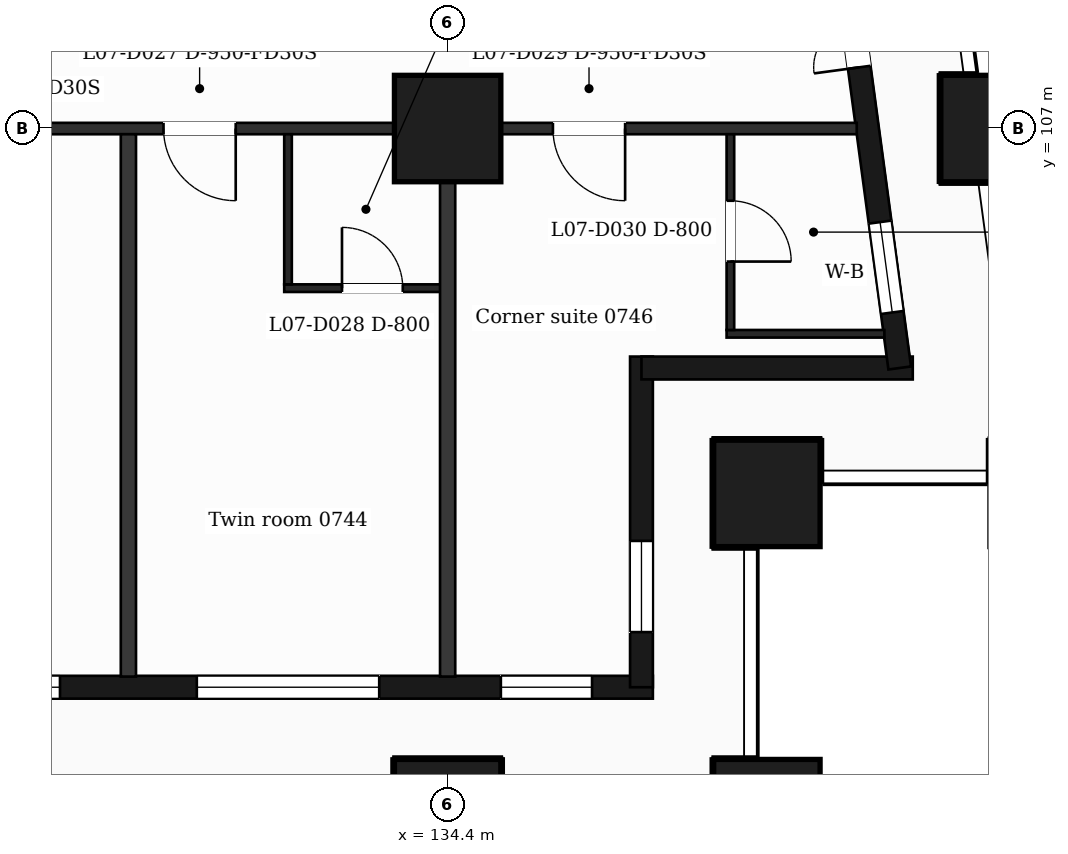
"""IFC4 building model, lengths in metres.
Left out: names, types, materials, properties, quantities, classifications, styles, units other than length and angle.
Written with IfcOpenShell. Run it as: python <this file> out.ifc"""

import sys

from ifc_helpers import new_model, si_unit, direction, frame, frame_2d, origin, origin_2d, place, context, subcontext, project, spatial, rectangle, extrude, element, fill, save


model = new_model("IFC4")
c1 = context("Model", 3, precision=1e-05, world=origin(), true_north=direction((0.0, 1.0)))
c2 = subcontext(c1, "Body", "Model", "MODEL_VIEW")
j1 = project(units=[si_unit("LENGTHUNIT", "METRE"), si_unit("PLANEANGLEUNIT", "RADIAN")], contexts=[c1])
p1 = place(None, origin())
s1 = spatial("IfcSite", under=j1, at=p1, CompositionType="ELEMENT")
p2 = place(p1, origin())
s2 = spatial("IfcBuilding", under=s1, at=p2, CompositionType="ELEMENT")
p3 = place(p2, frame((0.0, 0.0, 42.5)))
s3 = spatial("IfcBuildingStorey", under=s2, at=p3, CompositionType="ELEMENT", Elevation=42.5)
for number, where, z_axis, x_axis in (
    (1, (134.4, 98.0, 0.0), (0.0, 0.0, 1.0), (1.0, 0.0, 0.0)),
    (2, (138.6, 98.0, 0.0), (0.0, 0.0, 1.0), (1.0, 0.0, 0.0)),
    (3, (138.6, 102.2, 0.0), (0.0, 0.0, 1.0), (1.0, 0.0, 0.0)),
    (4, (134.4, 107.0, 0.0), (0.0, 0.0, 1.0), (1.0, 0.0, 0.0)),
    (5, (141.588, 107.0, 0.0), (0.0, 0.0, 1.0), (1.0, 0.0, 0.0)),
):
    element("IfcColumn", number, at=place(p3, frame(where, z_axis=z_axis, x_axis=x_axis)), inside=s3, PredefinedType="COLUMN", context=c2, shape_type="SweptSolid", body=[
        extrude(rectangle(XDim=1.4, YDim=1.4, at=origin_2d()), origin(), (0.0, 0.0, 1.0), 3.5),
    ])
p4 = place(p3, frame((89.85, 99.65, 0.0), z_axis=(0.0, 0.0, 1.0), x_axis=(1.0, 0.0, 0.0)))
e6 = element("IfcWall", 6, at=p4, inside=s3, PredefinedType="SOLIDWALL", context=c2, shape_type="SweptSolid", body=[
    extrude(rectangle(XDim=47.25, YDim=0.3, at=frame_2d((23.625, 0.0))), origin(), (0.0, 0.0, 1.0), 3.18),
])
p5 = place(p4, frame((0.725, 0.0, 0.9)))
e7 = element("IfcOpeningElement", 7, at=p5, cuts=e6, PredefinedType="OPENING", context=c2, shape_type="SweptSolid", body=[
    extrude(rectangle(XDim=1.2, YDim=2.1, at=frame_2d((0.6, 1.05))), frame((0.0, 0.16, 0.0), z_axis=(0.0, -1.0, 0.0), x_axis=(1.0, 0.0, 0.0)), (0.0, 0.0, 1.0), 0.32),
])
p6 = place(p4, frame((3.45, 0.0, 0.9)))
e8 = element("IfcOpeningElement", 8, at=p6, cuts=e6, PredefinedType="OPENING", context=c2, shape_type="SweptSolid", body=[
    extrude(rectangle(XDim=2.4, YDim=2.1, at=frame_2d((1.2, 1.05))), frame((0.0, 0.16, 0.0), z_axis=(0.0, -1.0, 0.0), x_axis=(1.0, 0.0, 0.0)), (0.0, 0.0, 1.0), 0.32),
])
p7 = place(p4, frame((7.35, 0.0, 0.0)))
e9 = element("IfcOpeningElement", 9, at=p7, cuts=e6, PredefinedType="OPENING", context=c2, shape_type="SweptSolid", body=[
    extrude(rectangle(XDim=1.2, YDim=2.4, at=frame_2d((0.6, 1.2))), frame((0.0, 0.16, 0.0), z_axis=(0.0, -1.0, 0.0), x_axis=(1.0, 0.0, 0.0)), (0.0, 0.0, 1.0), 0.32),
])
p8 = place(p4, frame((9.15, 0.0, 0.9)))
e10 = element("IfcOpeningElement", 10, at=p8, cuts=e6, PredefinedType="OPENING", context=c2, shape_type="SweptSolid", body=[
    extrude(rectangle(XDim=1.2, YDim=2.1, at=frame_2d((0.6, 1.05))), frame((0.0, 0.16, 0.0), z_axis=(0.0, -1.0, 0.0), x_axis=(1.0, 0.0, 0.0)), (0.0, 0.0, 1.0), 0.32),
])
p9 = place(p4, frame((11.85, 0.0, 0.9)))
e11 = element("IfcOpeningElement", 11, at=p9, cuts=e6, PredefinedType="OPENING", context=c2, shape_type="SweptSolid", body=[
    extrude(rectangle(XDim=2.4, YDim=2.1, at=frame_2d((1.2, 1.05))), frame((0.0, 0.16, 0.0), z_axis=(0.0, -1.0, 0.0), x_axis=(1.0, 0.0, 0.0)), (0.0, 0.0, 1.0), 0.32),
])
p10 = place(p4, frame((16.05, 0.0, 0.9)))
e12 = element("IfcOpeningElement", 12, at=p10, cuts=e6, PredefinedType="OPENING", context=c2, shape_type="SweptSolid", body=[
    extrude(rectangle(XDim=2.4, YDim=2.1, at=frame_2d((1.2, 1.05))), frame((0.0, 0.16, 0.0), z_axis=(0.0, -1.0, 0.0), x_axis=(1.0, 0.0, 0.0)), (0.0, 0.0, 1.0), 0.32),
])
p11 = place(p4, frame((20.85, 0.0, 0.9)))
e13 = element("IfcOpeningElement", 13, at=p11, cuts=e6, PredefinedType="OPENING", context=c2, shape_type="SweptSolid", body=[
    extrude(rectangle(XDim=1.2, YDim=2.1, at=frame_2d((0.6, 1.05))), frame((0.0, 0.16, 0.0), z_axis=(0.0, -1.0, 0.0), x_axis=(1.0, 0.0, 0.0)), (0.0, 0.0, 1.0), 0.32),
])
p12 = place(p4, frame((25.05, 0.0, 0.9)))
e14 = element("IfcOpeningElement", 14, at=p12, cuts=e6, PredefinedType="OPENING", context=c2, shape_type="SweptSolid", body=[
    extrude(rectangle(XDim=1.2, YDim=2.1, at=frame_2d((0.6, 1.05))), frame((0.0, 0.16, 0.0), z_axis=(0.0, -1.0, 0.0), x_axis=(1.0, 0.0, 0.0)), (0.0, 0.0, 1.0), 0.32),
])
p13 = place(p4, frame((28.65, 0.0, 0.9)))
e15 = element("IfcOpeningElement", 15, at=p13, cuts=e6, PredefinedType="OPENING", context=c2, shape_type="SweptSolid", body=[
    extrude(rectangle(XDim=2.4, YDim=2.1, at=frame_2d((1.2, 1.05))), frame((0.0, 0.16, 0.0), z_axis=(0.0, -1.0, 0.0), x_axis=(1.0, 0.0, 0.0)), (0.0, 0.0, 1.0), 0.32),
])
p14 = place(p4, frame((32.85, 0.0, 0.9)))
e16 = element("IfcOpeningElement", 16, at=p14, cuts=e6, PredefinedType="OPENING", context=c2, shape_type="SweptSolid", body=[
    extrude(rectangle(XDim=2.4, YDim=2.1, at=frame_2d((1.2, 1.05))), frame((0.0, 0.16, 0.0), z_axis=(0.0, -1.0, 0.0), x_axis=(1.0, 0.0, 0.0)), (0.0, 0.0, 1.0), 0.32),
])
p15 = place(p4, frame((37.05, 0.0, 0.9)))
e17 = element("IfcOpeningElement", 17, at=p15, cuts=e6, PredefinedType="OPENING", context=c2, shape_type="SweptSolid", body=[
    extrude(rectangle(XDim=2.4, YDim=2.1, at=frame_2d((1.2, 1.05))), frame((0.0, 0.16, 0.0), z_axis=(0.0, -1.0, 0.0), x_axis=(1.0, 0.0, 0.0)), (0.0, 0.0, 1.0), 0.32),
])
p16 = place(p4, frame((41.25, 0.0, 0.9)))
e18 = element("IfcOpeningElement", 18, at=p16, cuts=e6, PredefinedType="OPENING", context=c2, shape_type="SweptSolid", body=[
    extrude(rectangle(XDim=2.4, YDim=2.1, at=frame_2d((1.2, 1.05))), frame((0.0, 0.16, 0.0), z_axis=(0.0, -1.0, 0.0), x_axis=(1.0, 0.0, 0.0)), (0.0, 0.0, 1.0), 0.32),
])
p17 = place(p4, frame((45.25, 0.0, 0.9)))
e19 = element("IfcOpeningElement", 19, at=p17, cuts=e6, PredefinedType="OPENING", context=c2, shape_type="SweptSolid", body=[
    extrude(rectangle(XDim=1.2, YDim=2.1, at=frame_2d((0.6, 1.05))), frame((0.0, 0.16, 0.0), z_axis=(0.0, -1.0, 0.0), x_axis=(1.0, 0.0, 0.0)), (0.0, 0.0, 1.0), 0.32),
])
p18 = place(p3, frame((136.95, 99.65, 0.0), z_axis=(0.0, 0.0, 1.0), x_axis=(0.0, 1.0, 0.0)))
e20 = element("IfcWall", 20, at=p18, inside=s3, PredefinedType="SOLIDWALL", context=c2, shape_type="SweptSolid", body=[
    extrude(rectangle(XDim=4.35, YDim=0.3, at=frame_2d((2.175, 0.0))), origin(), (0.0, 0.0, 1.0), 3.18),
])
p19 = place(p18, frame((0.725, 0.0, 0.9)))
e21 = element("IfcOpeningElement", 21, at=p19, cuts=e20, PredefinedType="OPENING", context=c2, shape_type="SweptSolid", body=[
    extrude(rectangle(XDim=1.2, YDim=2.1, at=frame_2d((0.6, 1.05))), frame((0.0, 0.16, 0.0), z_axis=(0.0, -1.0, 0.0), x_axis=(1.0, 0.0, 0.0)), (0.0, 0.0, 1.0), 0.32),
])
p20 = place(p3, frame((136.95, 103.85, 0.0), z_axis=(0.0, 0.0, 1.0), x_axis=(1.0, 0.0, 0.0)))
e22 = element("IfcWall", 22, at=p20, inside=s3, PredefinedType="SOLIDWALL", context=c2, shape_type="SweptSolid", body=[
    extrude(rectangle(XDim=3.569, YDim=0.3, at=frame_2d((1.785, 0.0))), origin(), (0.0, 0.0, 1.0), 3.18),
])
p21 = place(p3, frame((140.348, 103.85, 0.0), z_axis=(0.0, 0.0, 1.0), x_axis=(-0.133431549479, 0.991058031401, 0.0)))
e23 = element("IfcWall", 23, at=p21, inside=s3, PredefinedType="SOLIDWALL", context=c2, shape_type="SweptSolid", body=[
    extrude(rectangle(XDim=6.609, YDim=0.3, at=frame_2d((3.304, 0.0))), origin(), (0.0, 0.0, 1.0), 3.18),
])
p22 = place(p21, frame((0.737, 0.0, 0.9)))
e24 = element("IfcOpeningElement", 24, at=p22, cuts=e23, PredefinedType="OPENING", context=c2, shape_type="SweptSolid", body=[
    extrude(rectangle(XDim=1.2, YDim=2.1, at=frame_2d((0.6, 1.05))), frame((0.0, 0.16, 0.0), z_axis=(0.0, -1.0, 0.0), x_axis=(1.0, 0.0, 0.0)), (0.0, 0.0, 1.0), 0.32),
])
p23 = place(p21, frame((3.991, 0.0, 0.0)))
e25 = element("IfcOpeningElement", 25, at=p23, cuts=e23, PredefinedType="OPENING", context=c2, shape_type="SweptSolid", body=[
    extrude(rectangle(XDim=1.2, YDim=2.4, at=frame_2d((0.6, 1.2))), frame((0.0, 0.16, 0.0), z_axis=(0.0, -1.0, 0.0), x_axis=(1.0, 0.0, 0.0)), (0.0, 0.0, 1.0), 0.32),
])
p24 = place(p3, frame((138.07, 104.3, 0.0), z_axis=(0.0, 0.0, 1.0), x_axis=(1.0, 0.0, 0.0)))
e26 = element("IfcWall", 26, at=p24, inside=s3, PredefinedType="PARTITIONING", context=c2, shape_type="SweptSolid", body=[
    extrude(rectangle(XDim=2.076, YDim=0.1, at=frame_2d((1.038, 0.0))), origin(), (0.0, 0.0, 1.0), 3.18),
])
p25 = place(p3, frame((132.25, 104.9, 0.0), z_axis=(0.0, 0.0, 1.0), x_axis=(1.0, 0.0, 0.0)))
e27 = element("IfcWall", 27, at=p25, inside=s3, PredefinedType="PARTITIONING", context=c2, shape_type="SweptSolid", body=[
    extrude(rectangle(XDim=2.15, YDim=0.1, at=frame_2d((1.075, 0.0))), origin(), (0.0, 0.0, 1.0), 3.18),
])
p26 = place(p25, frame((0.76, 0.0, 0.0)))
e28 = element("IfcOpeningElement", 28, at=p26, cuts=e27, PredefinedType="OPENING", context=c2, shape_type="SweptSolid", body=[
    extrude(rectangle(XDim=0.8, YDim=2.1, at=frame_2d((0.4, 1.05))), frame((0.0, 0.06, 0.0), z_axis=(0.0, -1.0, 0.0), x_axis=(1.0, 0.0, 0.0)), (0.0, 0.0, 1.0), 0.12),
])
p27 = place(p3, frame((87.018, 107.0, 0.0), z_axis=(0.0, 0.0, 1.0), x_axis=(1.0, 0.0, 0.0)))
e29 = element("IfcWall", 29, at=p27, inside=s3, PredefinedType="PARTITIONING", context=c2, shape_type="SweptSolid", body=[
    extrude(rectangle(XDim=52.765, YDim=0.15, at=frame_2d((26.382, 0.0))), origin(), (0.0, 0.0, 1.0), 3.18),
])
p28 = place(p27, frame((1.032, 0.0, 0.0)))
e30 = element("IfcOpeningElement", 30, at=p28, cuts=e29, PredefinedType="OPENING", context=c2, shape_type="SweptSolid", body=[
    extrude(rectangle(XDim=0.95, YDim=2.1, at=frame_2d((0.475, 1.05))), frame((0.0, 0.085, 0.0), z_axis=(0.0, -1.0, 0.0), x_axis=(1.0, 0.0, 0.0)), (0.0, 0.0, 1.0), 0.17),
])
p29 = place(p27, frame((6.369, 0.0, 0.0)))
e31 = element("IfcOpeningElement", 31, at=p29, cuts=e29, PredefinedType="OPENING", context=c2, shape_type="SweptSolid", body=[
    extrude(rectangle(XDim=0.95, YDim=2.1, at=frame_2d((0.475, 1.05))), frame((0.0, 0.085, 0.0), z_axis=(0.0, -1.0, 0.0), x_axis=(1.0, 0.0, 0.0)), (0.0, 0.0, 1.0), 0.17),
])
p30 = place(p27, frame((10.952, 0.0, 0.0)))
e32 = element("IfcOpeningElement", 32, at=p30, cuts=e29, PredefinedType="OPENING", context=c2, shape_type="SweptSolid", body=[
    extrude(rectangle(XDim=0.95, YDim=2.1, at=frame_2d((0.475, 1.05))), frame((0.0, 0.085, 0.0), z_axis=(0.0, -1.0, 0.0), x_axis=(1.0, 0.0, 0.0)), (0.0, 0.0, 1.0), 0.17),
])
p31 = place(p27, frame((16.045, 0.0, 0.0)))
e33 = element("IfcOpeningElement", 33, at=p31, cuts=e29, PredefinedType="OPENING", context=c2, shape_type="SweptSolid", body=[
    extrude(rectangle(XDim=0.95, YDim=2.1, at=frame_2d((0.475, 1.05))), frame((0.0, 0.085, 0.0), z_axis=(0.0, -1.0, 0.0), x_axis=(1.0, 0.0, 0.0)), (0.0, 0.0, 1.0), 0.17),
])
p32 = place(p27, frame((20.245, 0.0, 0.0)))
e34 = element("IfcOpeningElement", 34, at=p32, cuts=e29, PredefinedType="OPENING", context=c2, shape_type="SweptSolid", body=[
    extrude(rectangle(XDim=0.95, YDim=2.1, at=frame_2d((0.475, 1.05))), frame((0.0, 0.085, 0.0), z_axis=(0.0, -1.0, 0.0), x_axis=(1.0, 0.0, 0.0)), (0.0, 0.0, 1.0), 0.17),
])
p33 = place(p27, frame((24.969, 0.0, 0.0)))
e35 = element("IfcOpeningElement", 35, at=p33, cuts=e29, PredefinedType="OPENING", context=c2, shape_type="SweptSolid", body=[
    extrude(rectangle(XDim=0.95, YDim=2.1, at=frame_2d((0.475, 1.05))), frame((0.0, 0.085, 0.0), z_axis=(0.0, -1.0, 0.0), x_axis=(1.0, 0.0, 0.0)), (0.0, 0.0, 1.0), 0.17),
])
p34 = place(p27, frame((26.807, 0.0, 0.0)))
e36 = element("IfcOpeningElement", 36, at=p34, cuts=e29, PredefinedType="OPENING", context=c2, shape_type="SweptSolid", body=[
    extrude(rectangle(XDim=0.95, YDim=2.1, at=frame_2d((0.475, 1.05))), frame((0.0, 0.085, 0.0), z_axis=(0.0, -1.0, 0.0), x_axis=(1.0, 0.0, 0.0)), (0.0, 0.0, 1.0), 0.17),
])
p35 = place(p27, frame((31.952, 0.0, 0.0)))
e37 = element("IfcOpeningElement", 37, at=p35, cuts=e29, PredefinedType="OPENING", context=c2, shape_type="SweptSolid", body=[
    extrude(rectangle(XDim=0.95, YDim=2.1, at=frame_2d((0.475, 1.05))), frame((0.0, 0.085, 0.0), z_axis=(0.0, -1.0, 0.0), x_axis=(1.0, 0.0, 0.0)), (0.0, 0.0, 1.0), 0.17),
])
p36 = place(p27, frame((40.795, 0.0, 0.0)))
e38 = element("IfcOpeningElement", 38, at=p36, cuts=e29, PredefinedType="OPENING", context=c2, shape_type="SweptSolid", body=[
    extrude(rectangle(XDim=0.95, YDim=2.1, at=frame_2d((0.475, 1.05))), frame((0.0, 0.085, 0.0), z_axis=(0.0, -1.0, 0.0), x_axis=(1.0, 0.0, 0.0)), (0.0, 0.0, 1.0), 0.17),
])
p37 = place(p27, frame((43.644, 0.0, 0.0)))
e39 = element("IfcOpeningElement", 39, at=p37, cuts=e29, PredefinedType="OPENING", context=c2, shape_type="SweptSolid", body=[
    extrude(rectangle(XDim=0.95, YDim=2.1, at=frame_2d((0.475, 1.05))), frame((0.0, 0.085, 0.0), z_axis=(0.0, -1.0, 0.0), x_axis=(1.0, 0.0, 0.0)), (0.0, 0.0, 1.0), 0.17),
])
p38 = place(p27, frame((48.767, 0.0, 0.0)))
e40 = element("IfcOpeningElement", 40, at=p38, cuts=e29, PredefinedType="OPENING", context=c2, shape_type="SweptSolid", body=[
    extrude(rectangle(XDim=0.95, YDim=2.1, at=frame_2d((0.475, 1.05))), frame((0.0, 0.085, 0.0), z_axis=(0.0, -1.0, 0.0), x_axis=(1.0, 0.0, 0.0)), (0.0, 0.0, 1.0), 0.17),
])
p39 = place(p3, frame((130.2, 99.79, 0.0), z_axis=(0.0, 0.0, 1.0), x_axis=(0.0, 1.0, 0.0)))
e41 = element("IfcWall", 41, at=p39, inside=s3, PredefinedType="PARTITIONING", context=c2, shape_type="SweptSolid", body=[
    extrude(rectangle(XDim=7.135, YDim=0.2, at=frame_2d((3.567, 0.0))), origin(), (0.0, 0.0, 1.0), 3.18),
])
p40 = place(p3, frame((132.3, 104.95, 0.0), z_axis=(0.0, 0.0, 1.0), x_axis=(0.0, 1.0, 0.0)))
e42 = element("IfcWall", 42, at=p40, inside=s3, PredefinedType="PARTITIONING", context=c2, shape_type="SweptSolid", body=[
    extrude(rectangle(XDim=1.975, YDim=0.1, at=frame_2d((0.988, 0.0))), origin(), (0.0, 0.0, 1.0), 3.18),
])
p41 = place(p3, frame((134.4, 99.79, 0.0), z_axis=(0.0, 0.0, 1.0), x_axis=(0.0, 1.0, 0.0)))
e43 = element("IfcWall", 43, at=p41, inside=s3, PredefinedType="PARTITIONING", context=c2, shape_type="SweptSolid", body=[
    extrude(rectangle(XDim=7.135, YDim=0.2, at=frame_2d((3.567, 0.0))), origin(), (0.0, 0.0, 1.0), 3.18),
])
p42 = place(p3, frame((138.12, 104.35, 0.0), z_axis=(0.0, 0.0, 1.0), x_axis=(0.0, 1.0, 0.0)))
e44 = element("IfcWall", 44, at=p42, inside=s3, PredefinedType="PARTITIONING", context=c2, shape_type="SweptSolid", body=[
    extrude(rectangle(XDim=2.575, YDim=0.1, at=frame_2d((1.288, 0.0))), origin(), (0.0, 0.0, 1.0), 3.18),
])
p43 = place(p42, frame((0.9, 0.0, 0.0)))
e45 = element("IfcOpeningElement", 45, at=p43, cuts=e44, PredefinedType="OPENING", context=c2, shape_type="SweptSolid", body=[
    extrude(rectangle(XDim=0.8, YDim=2.1, at=frame_2d((0.4, 1.05))), frame((0.0, 0.06, 0.0), z_axis=(0.0, -1.0, 0.0), x_axis=(1.0, 0.0, 0.0)), (0.0, 0.0, 1.0), 0.12),
])
p44 = place(p15, origin())
e46 = element("IfcWindow", 46, at=p44, inside=s3, PartitioningType="SINGLE_PANEL", PredefinedType="WINDOW", context=c2, shape_type="SweptSolid", body=[
    extrude(rectangle(XDim=2.4, YDim=2.1, at=frame_2d((1.2, 1.05))), frame((0.0, 0.03, 0.0), z_axis=(0.0, -1.0, 0.0), x_axis=(1.0, 0.0, 0.0)), (0.0, 0.0, 1.0), 0.06),
])
fill(e17, e46)
p45 = place(p16, origin())
e47 = element("IfcWindow", 47, at=p45, inside=s3, PartitioningType="SINGLE_PANEL", PredefinedType="WINDOW", context=c2, shape_type="SweptSolid", body=[
    extrude(rectangle(XDim=2.4, YDim=2.1, at=frame_2d((1.2, 1.05))), frame((0.0, 0.03, 0.0), z_axis=(0.0, -1.0, 0.0), x_axis=(1.0, 0.0, 0.0)), (0.0, 0.0, 1.0), 0.06),
])
fill(e18, e47)
p46 = place(p17, origin())
e48 = element("IfcWindow", 48, at=p46, inside=s3, PartitioningType="SINGLE_PANEL", PredefinedType="WINDOW", context=c2, shape_type="SweptSolid", body=[
    extrude(rectangle(XDim=1.2, YDim=2.1, at=frame_2d((0.6, 1.05))), frame((0.0, 0.03, 0.0), z_axis=(0.0, -1.0, 0.0), x_axis=(1.0, 0.0, 0.0)), (0.0, 0.0, 1.0), 0.06),
])
fill(e19, e48)
p47 = place(p19, origin())
e49 = element("IfcWindow", 49, at=p47, inside=s3, PartitioningType="SINGLE_PANEL", PredefinedType="WINDOW", context=c2, shape_type="SweptSolid", body=[
    extrude(rectangle(XDim=1.2, YDim=2.1, at=frame_2d((0.6, 1.05))), frame((0.0, 0.03, 0.0), z_axis=(0.0, -1.0, 0.0), x_axis=(1.0, 0.0, 0.0)), (0.0, 0.0, 1.0), 0.06),
])
fill(e21, e49)
p48 = place(p22, origin())
e50 = element("IfcWindow", 50, at=p48, inside=s3, PartitioningType="SINGLE_PANEL", PredefinedType="WINDOW", context=c2, shape_type="SweptSolid", body=[
    extrude(rectangle(XDim=1.2, YDim=2.1, at=frame_2d((0.6, 1.05))), frame((0.0, 0.03, 0.0), z_axis=(0.0, -1.0, 0.0), x_axis=(1.0, 0.0, 0.0)), (0.0, 0.0, 1.0), 0.06),
])
fill(e24, e50)
p49 = place(p23, origin())
e51 = element("IfcDoor", 51, at=p49, inside=s3, OperationType="DOUBLE_DOOR_SINGLE_SWING", PredefinedType="DOOR", context=c2, shape_type="SweptSolid", body=[
    extrude(rectangle(XDim=1.2, YDim=2.4, at=frame_2d((0.6, 1.2))), frame((0.0, 0.025, 0.0), z_axis=(0.0, -1.0, 0.0), x_axis=(1.0, 0.0, 0.0)), (0.0, 0.0, 1.0), 0.05),
])
fill(e25, e51)
p50 = place(p37, origin())
e52 = element("IfcDoor", 52, at=p50, inside=s3, OperationType="SINGLE_SWING_RIGHT", PredefinedType="DOOR", context=c2, shape_type="SweptSolid", body=[
    extrude(rectangle(XDim=0.95, YDim=2.1, at=frame_2d((0.475, 1.05))), frame((0.0, 0.025, 0.0), z_axis=(0.0, -1.0, 0.0), x_axis=(1.0, 0.0, 0.0)), (0.0, 0.0, 1.0), 0.05),
])
fill(e39, e52)
p51 = place(p26, origin())
e53 = element("IfcDoor", 53, at=p51, inside=s3, OperationType="SINGLE_SWING_LEFT", PredefinedType="DOOR", context=c2, shape_type="SweptSolid", body=[
    extrude(rectangle(XDim=0.8, YDim=2.1, at=frame_2d((0.4, 1.05))), frame((0.0, 0.025, 0.0), z_axis=(0.0, -1.0, 0.0), x_axis=(1.0, 0.0, 0.0)), (0.0, 0.0, 1.0), 0.05),
])
fill(e28, e53)
p52 = place(p38, origin())
e54 = element("IfcDoor", 54, at=p52, inside=s3, OperationType="SINGLE_SWING_RIGHT", PredefinedType="DOOR", context=c2, shape_type="SweptSolid", body=[
    extrude(rectangle(XDim=0.95, YDim=2.1, at=frame_2d((0.475, 1.05))), frame((0.0, 0.025, 0.0), z_axis=(0.0, -1.0, 0.0), x_axis=(1.0, 0.0, 0.0)), (0.0, 0.0, 1.0), 0.05),
])
fill(e40, e54)
p53 = place(p43, origin())
e55 = element("IfcDoor", 55, at=p53, inside=s3, OperationType="SINGLE_SWING_LEFT", PredefinedType="DOOR", context=c2, shape_type="SweptSolid", body=[
    extrude(rectangle(XDim=0.8, YDim=2.1, at=frame_2d((0.4, 1.05))), frame((0.0, 0.025, 0.0), z_axis=(0.0, -1.0, 0.0), x_axis=(1.0, 0.0, 0.0)), (0.0, 0.0, 1.0), 0.05),
])
fill(e45, e55)
save(model, sys.argv[1])
